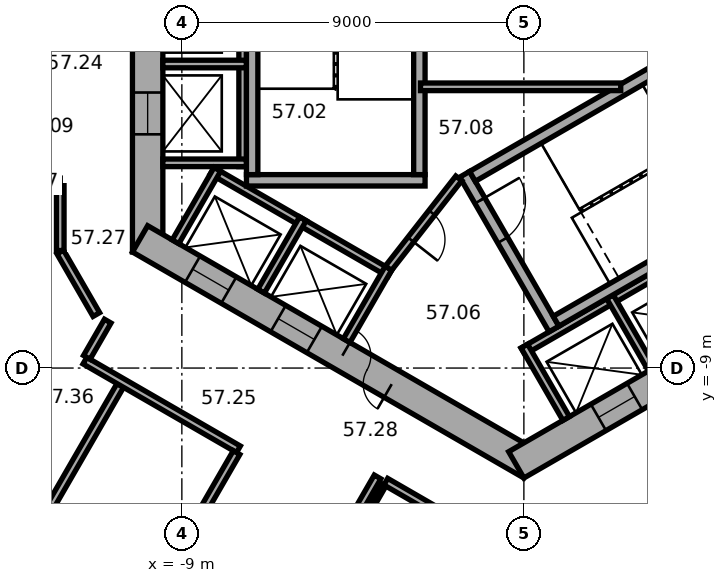
"""IFC4 building model, lengths in metres.
Left out: names, types, materials, properties, quantities, classifications, styles, units other than length and angle.
Written with IfcOpenShell. Run it as: python <this file> out.ifc"""

import sys

from ifc_helpers import new_model, si_unit, direction, frame, frame_2d, origin, place, context, subcontext, project, spatial, rectangle, extrude, element, fill, save


model = new_model("IFC4")
c1 = context("Model", 3, precision=1e-05, world=origin(), true_north=direction((0.0, 1.0)))
c2 = subcontext(c1, "Body", "Model", "MODEL_VIEW")
j1 = project(units=[si_unit("LENGTHUNIT", "METRE"), si_unit("PLANEANGLEUNIT", "RADIAN")], contexts=[c1])
p1 = place(None, origin())
s1 = spatial("IfcSite", under=j1, at=p1, CompositionType="ELEMENT")
p2 = place(p1, origin())
s2 = spatial("IfcBuilding", under=s1, at=p2, CompositionType="ELEMENT")
p3 = place(p2, frame((0.0, 0.0, 232.8)))
s3 = spatial("IfcBuildingStorey", under=s2, at=p3, CompositionType="ELEMENT", Elevation=232.8)
p4 = place(p3, frame((-9.9, 5.947, 0.0), z_axis=(0.0, 0.0, 1.0), x_axis=(0.0, -1.0, 0.0)))
e1 = element("IfcWall", 1, at=p4, inside=s3, PredefinedType="SHEAR", context=c2, shape_type="SweptSolid", body=[
    extrude(rectangle(XDim=11.894, YDim=0.8, at=frame_2d((5.947, 0.0))), origin(), (0.0, 0.0, 1.0), 3.7),
])
p5 = place(p4, frame((5.097, 0.0, 0.0)))
e2 = element("IfcOpeningElement", 2, at=p5, cuts=e1, PredefinedType="OPENING", context=c2, shape_type="SweptSolid", body=[
    extrude(rectangle(XDim=1.1, YDim=2.1, at=frame_2d((0.55, 1.05))), frame((0.0, 0.41, 0.0), z_axis=(0.0, -1.0, 0.0), x_axis=(1.0, 0.0, 0.0)), (0.0, 0.0, 1.0), 0.82),
])
p6 = place(p4, frame((7.697, 0.0, 0.0)))
e3 = element("IfcOpeningElement", 3, at=p6, cuts=e1, PredefinedType="OPENING", context=c2, shape_type="SweptSolid", body=[
    extrude(rectangle(XDim=1.1, YDim=2.1, at=frame_2d((0.55, 1.05))), frame((0.0, 0.41, 0.0), z_axis=(0.0, -1.0, 0.0), x_axis=(1.0, 0.0, 0.0)), (0.0, 0.0, 1.0), 0.82),
])
p7 = place(p3, frame((-10.1, -5.6, 0.0), z_axis=(0.0, 0.0, 1.0), x_axis=(0.866023897231, -0.500002609418, 0.0)))
e4 = element("IfcWall", 4, at=p7, inside=s3, PredefinedType="SHEAR", context=c2, shape_type="SweptSolid", body=[
    extrude(rectangle(XDim=11.894, YDim=0.8, at=frame_2d((5.947, 0.0))), origin(), (0.0, 0.0, 1.0), 3.7),
])
p8 = place(p7, frame((6.147, 0.0, 0.0)))
e5 = element("IfcOpeningElement", 5, at=p8, cuts=e4, PredefinedType="OPENING", context=c2, shape_type="SweptSolid", body=[
    extrude(rectangle(XDim=1.5, YDim=2.1, at=frame_2d((0.75, 1.05))), frame((0.0, 0.41, 0.0), z_axis=(0.0, -1.0, 0.0), x_axis=(1.0, 0.0, 0.0)), (0.0, 0.0, 1.0), 0.82),
])
p9 = place(p7, frame((1.597, 0.0, 0.0)))
e6 = element("IfcOpeningElement", 6, at=p9, cuts=e4, PredefinedType="OPENING", context=c2, shape_type="SweptSolid", body=[
    extrude(rectangle(XDim=1.1, YDim=2.1, at=frame_2d((0.55, 1.05))), frame((0.0, 0.41, 0.0), z_axis=(0.0, -1.0, 0.0), x_axis=(1.0, 0.0, 0.0)), (0.0, 0.0, 1.0), 0.82),
])
p10 = place(p7, frame((4.197, 0.0, 0.0)))
e7 = element("IfcOpeningElement", 7, at=p10, cuts=e4, PredefinedType="OPENING", context=c2, shape_type="SweptSolid", body=[
    extrude(rectangle(XDim=1.1, YDim=2.1, at=frame_2d((0.55, 1.05))), frame((0.0, 0.41, 0.0), z_axis=(0.0, -1.0, 0.0), x_axis=(1.0, 0.0, 0.0)), (0.0, 0.0, 1.0), 0.82),
])
p11 = place(p3, frame((-0.2, -11.547, 0.0), z_axis=(0.0, 0.0, 1.0), x_axis=(0.866023897231, 0.500002609418, 0.0)))
e8 = element("IfcWall", 8, at=p11, inside=s3, PredefinedType="SHEAR", context=c2, shape_type="SweptSolid", body=[
    extrude(rectangle(XDim=11.894, YDim=0.8, at=frame_2d((5.947, 0.0))), origin(), (0.0, 0.0, 1.0), 3.7),
])
p12 = place(p11, frame((2.497, 0.0, 0.0)))
e9 = element("IfcOpeningElement", 9, at=p12, cuts=e8, PredefinedType="OPENING", context=c2, shape_type="SweptSolid", body=[
    extrude(rectangle(XDim=1.1, YDim=2.1, at=frame_2d((0.55, 1.05))), frame((0.0, 0.41, 0.0), z_axis=(0.0, -1.0, 0.0), x_axis=(1.0, 0.0, 0.0)), (0.0, 0.0, 1.0), 0.82),
])
p13 = place(p11, frame((5.097, 0.0, 0.0)))
e10 = element("IfcOpeningElement", 10, at=p13, cuts=e8, PredefinedType="OPENING", context=c2, shape_type="SweptSolid", body=[
    extrude(rectangle(XDim=1.1, YDim=2.1, at=frame_2d((0.55, 1.05))), frame((0.0, 0.41, 0.0), z_axis=(0.0, -1.0, 0.0), x_axis=(1.0, 0.0, 0.0)), (0.0, 0.0, 1.0), 0.82),
])
p14 = place(p11, frame((7.697, 0.0, 0.0)))
e11 = element("IfcOpeningElement", 11, at=p14, cuts=e8, PredefinedType="OPENING", context=c2, shape_type="SweptSolid", body=[
    extrude(rectangle(XDim=1.1, YDim=2.1, at=frame_2d((0.55, 1.05))), frame((0.0, 0.41, 0.0), z_axis=(0.0, -1.0, 0.0), x_axis=(1.0, 0.0, 0.0)), (0.0, 0.0, 1.0), 0.82),
])
p15 = place(p3, frame((2.739, -22.711, 0.0), z_axis=(0.0, 0.0, 1.0), x_axis=(0.833885723098, 0.551937134838, 0.0)))
e12 = element("IfcWall", 12, at=p15, inside=s3, PredefinedType="STANDARD", context=c2, shape_type="SweptSolid", body=[
    extrude(rectangle(XDim=18.841, YDim=0.2, at=frame_2d((9.421, 0.0))), origin(), (0.0, 0.0, 1.0), 3.7),
])
p16 = place(p15, frame((1.252, 0.0, 0.9)))
e13 = element("IfcOpeningElement", 13, at=p16, cuts=e12, PredefinedType="OPENING", context=c2, shape_type="SweptSolid", body=[
    extrude(rectangle(XDim=2.2, YDim=2.0, at=frame_2d((1.1, 1.0))), frame((0.0, 0.11, 0.0), z_axis=(0.0, -1.0, 0.0), x_axis=(1.0, 0.0, 0.0)), (0.0, 0.0, 1.0), 0.22),
])
p17 = place(p15, frame((4.786, 0.0, 0.9)))
e14 = element("IfcOpeningElement", 14, at=p17, cuts=e12, PredefinedType="OPENING", context=c2, shape_type="SweptSolid", body=[
    extrude(rectangle(XDim=2.2, YDim=2.0, at=frame_2d((1.1, 1.0))), frame((0.0, 0.11, 0.0), z_axis=(0.0, -1.0, 0.0), x_axis=(1.0, 0.0, 0.0)), (0.0, 0.0, 1.0), 0.22),
])
p18 = place(p15, frame((8.32, 0.0, 0.9)))
e15 = element("IfcOpeningElement", 15, at=p18, cuts=e12, PredefinedType="OPENING", context=c2, shape_type="SweptSolid", body=[
    extrude(rectangle(XDim=2.2, YDim=2.0, at=frame_2d((1.1, 1.0))), frame((0.0, 0.11, 0.0), z_axis=(0.0, -1.0, 0.0), x_axis=(1.0, 0.0, 0.0)), (0.0, 0.0, 1.0), 0.22),
])
p19 = place(p15, frame((11.854, 0.0, 0.9)))
e16 = element("IfcOpeningElement", 16, at=p19, cuts=e12, PredefinedType="OPENING", context=c2, shape_type="SweptSolid", body=[
    extrude(rectangle(XDim=2.2, YDim=2.0, at=frame_2d((1.1, 1.0))), frame((0.0, 0.11, 0.0), z_axis=(0.0, -1.0, 0.0), x_axis=(1.0, 0.0, 0.0)), (0.0, 0.0, 1.0), 0.22),
])
p20 = place(p15, frame((15.387, 0.0, 0.9)))
e17 = element("IfcOpeningElement", 17, at=p20, cuts=e12, PredefinedType="OPENING", context=c2, shape_type="SweptSolid", body=[
    extrude(rectangle(XDim=2.2, YDim=2.0, at=frame_2d((1.1, 1.0))), frame((0.0, 0.11, 0.0), z_axis=(0.0, -1.0, 0.0), x_axis=(1.0, 0.0, 0.0)), (0.0, 0.0, 1.0), 0.22),
])
p21 = place(p3, frame((-7.4, 4.3, 0.0), z_axis=(0.0, 0.0, 1.0), x_axis=(0.0, -1.0, 0.0)))
e18 = element("IfcWall", 18, at=p21, inside=s3, PredefinedType="PARTITIONING", context=c2, shape_type="SweptSolid", body=[
    extrude(rectangle(XDim=8.0, YDim=0.2, at=frame_2d((4.0, 0.0))), origin(), (0.0, 0.0, 1.0), 3.42),
])
for number, where, z_axis, x_axis in (
    (19, (-7.3, -1.0, 0.0), (0.0, 0.0, 1.0), (-1.0, 0.0, 0.0)),
    (20, (-7.3, -3.6, 0.0), (0.0, 0.0, 1.0), (-1.0, 0.0, 0.0)),
):
    element("IfcWall", number, at=place(p3, frame(where, z_axis=z_axis, x_axis=x_axis)), inside=s3, PredefinedType="PARTITIONING", context=c2, shape_type="SweptSolid", body=[
        extrude(rectangle(XDim=2.2, YDim=0.2, at=frame_2d((1.1, 0.0))), origin(), (0.0, 0.0, 1.0), 3.42),
    ])
p22 = place(p3, frame((-8.203, -3.809, 0.0), z_axis=(0.0, 0.0, 1.0), x_axis=(0.866028230842, -0.499995103361, 0.0)))
e21 = element("IfcWall", 21, at=p22, inside=s3, PredefinedType="PARTITIONING", context=c2, shape_type="SweptSolid", body=[
    extrude(rectangle(XDim=5.4, YDim=0.2, at=frame_2d((2.7, 0.0))), origin(), (0.0, 0.0, 1.0), 3.42),
])
for number, where, z_axis, x_axis in (
    (22, (-8.067, -3.772, 0.0), (0.0, 0.0, 1.0), (-0.5, -0.866, 0.0)),
    (23, (-5.815, -5.072, 0.0), (0.0, 0.0, 1.0), (-0.5, -0.866, 0.0)),
):
    element("IfcWall", number, at=place(p3, frame(where, z_axis=z_axis, x_axis=x_axis)), inside=s3, PredefinedType="PARTITIONING", context=c2, shape_type="SweptSolid", body=[
        extrude(rectangle(XDim=2.2, YDim=0.2, at=frame_2d((1.1, 0.0))), origin(), (0.0, 0.0, 1.0), 3.42),
    ])
p23 = place(p3, frame((-3.563, -6.372, 0.0), z_axis=(0.0, 0.0, 1.0), x_axis=(-0.499994660107, -0.866028486751, 0.0)))
e24 = element("IfcWall", 24, at=p23, inside=s3, PredefinedType="PARTITIONING", context=c2, shape_type="SweptSolid", body=[
    extrude(rectangle(XDim=2.2, YDim=0.2, at=frame_2d((1.1, 0.0))), origin(), (0.0, 0.0, 1.0), 3.42),
])
p24 = place(p3, frame((-0.024, -8.559, 0.0), z_axis=(0.0, 0.0, 1.0), x_axis=(0.866026010844, 0.49999894854, 0.0)))
e25 = element("IfcWall", 25, at=p24, inside=s3, PredefinedType="PARTITIONING", context=c2, shape_type="SweptSolid", body=[
    extrude(rectangle(XDim=8.0, YDim=0.2, at=frame_2d((4.0, 0.0))), origin(), (0.0, 0.0, 1.0), 3.42),
])
for number, where, z_axis, x_axis in (
    (26, (0.013, -8.422, 0.0), (0.0, 0.0, 1.0), (0.5, -0.866, 0.0)),
    (27, (2.264, -7.122, 0.0), (0.0, 0.0, 1.0), (0.5, -0.866, 0.0)),
):
    element("IfcWall", number, at=place(p3, frame(where, z_axis=z_axis, x_axis=x_axis)), inside=s3, PredefinedType="PARTITIONING", context=c2, shape_type="SweptSolid", body=[
        extrude(rectangle(XDim=2.2, YDim=0.2, at=frame_2d((1.1, 0.0))), origin(), (0.0, 0.0, 1.0), 3.42),
    ])
p25 = place(p3, frame((-2.6, -4.06, 0.0), z_axis=(0.0, 0.0, 1.0), x_axis=(-1.0, 0.0, 0.0)))
e28 = element("IfcWall", 28, at=p25, inside=s3, PredefinedType="SHEAR", context=c2, shape_type="SweptSolid", body=[
    extrude(rectangle(XDim=4.7, YDim=0.3, at=frame_2d((2.35, 0.0))), origin(), (0.0, 0.0, 1.0), 3.42),
])
for number, where, z_axis, x_axis in (
    (29, (-2.75, 3.15, 0.0), (0.0, 0.0, 1.0), (0.0, -1.0, 0.0)),
    (30, (-7.15, 3.15, 0.0), (0.0, 0.0, 1.0), (0.0, -1.0, 0.0)),
):
    element("IfcWall", number, at=place(p3, frame(where, z_axis=z_axis, x_axis=x_axis)), inside=s3, PredefinedType="SHEAR", context=c2, shape_type="SweptSolid", body=[
        extrude(rectangle(XDim=7.06, YDim=0.3, at=frame_2d((3.53, 0.0))), origin(), (0.0, 0.0, 1.0), 3.42),
    ])
p26 = place(p3, frame((-1.558, -3.902, 0.0), z_axis=(0.0, 0.0, 1.0), x_axis=(0.499977259774, -0.866038532462, 0.0)))
e31 = element("IfcWall", 31, at=p26, inside=s3, PredefinedType="SHEAR", context=c2, shape_type="SweptSolid", body=[
    extrude(rectangle(XDim=4.7, YDim=0.3, at=frame_2d((2.35, 0.0))), origin(), (0.0, 0.0, 1.0), 3.42),
])
p27 = place(p26, frame((0.8, 0.0, 0.0)))
e32 = element("IfcOpeningElement", 32, at=p27, cuts=e31, PredefinedType="OPENING", context=c2, shape_type="SweptSolid", body=[
    extrude(rectangle(XDim=1.2, YDim=2.1, at=frame_2d((0.6, 1.05))), frame((0.0, 0.16, 0.0), z_axis=(0.0, -1.0, 0.0), x_axis=(1.0, 0.0, 0.0)), (0.0, 0.0, 1.0), 0.32),
])
for number, where, z_axis, x_axis in (
    (33, (-1.353, -3.957, 0.0), (0.0, 0.0, 1.0), (0.866, 0.5, 0.0)),
    (34, (0.847, -7.767, 0.0), (0.0, 0.0, 1.0), (0.866, 0.5, 0.0)),
):
    element("IfcWall", number, at=place(p3, frame(where, z_axis=z_axis, x_axis=x_axis)), inside=s3, PredefinedType="SHEAR", context=c2, shape_type="SweptSolid", body=[
        extrude(rectangle(XDim=7.06, YDim=0.3, at=frame_2d((3.53, 0.0))), origin(), (0.0, 0.0, 1.0), 3.42),
    ])
p28 = place(p3, frame((-1.712, -4.008, 0.0), z_axis=(0.0, 0.0, 1.0), x_axis=(-0.616549420702, -0.787316208287, 0.0)))
e35 = element("IfcWall", 35, at=p28, inside=s3, PredefinedType="PARTITIONING", context=c2, shape_type="SweptSolid", body=[
    extrude(rectangle(XDim=3.002, YDim=0.2, at=frame_2d((1.501, 0.0))), origin(), (0.0, 0.0, 1.0), 3.42),
])
p29 = place(p28, frame((1.15, 0.0, 0.0)))
e36 = element("IfcOpeningElement", 36, at=p29, cuts=e35, PredefinedType="OPENING", context=c2, shape_type="SweptSolid", body=[
    extrude(rectangle(XDim=0.9, YDim=2.1, at=frame_2d((0.45, 1.05))), frame((0.0, 0.11, 0.0), z_axis=(0.0, -1.0, 0.0), x_axis=(1.0, 0.0, 0.0)), (0.0, 0.0, 1.0), 0.22),
])
p30 = place(p3, frame((-2.72, -1.6, 0.0), z_axis=(0.0, 0.0, 1.0), x_axis=(1.0, 0.0, 0.0)))
e37 = element("IfcWall", 37, at=p30, inside=s3, PredefinedType="PARTITIONING", context=c2, shape_type="SweptSolid", body=[
    extrude(rectangle(XDim=5.269, YDim=0.2, at=frame_2d((2.634, 0.0))), origin(), (0.0, 0.0, 1.0), 3.42),
])
p31 = place(p3, frame((-13.646, -14.696, 0.0), z_axis=(0.0, 0.0, 1.0), x_axis=(0.500006596359, 0.866021595341, 0.0)))
e38 = element("IfcWall", 38, at=p31, inside=s3, PredefinedType="PARTITIONING", context=c2, shape_type="SweptSolid", body=[
    extrude(rectangle(XDim=6.049, YDim=0.2, at=frame_2d((3.025, 0.0))), origin(), (0.0, 0.0, 1.0), 3.42),
])
p32 = place(p3, frame((-13.401, -4.101, 0.0), z_axis=(0.0, 0.0, 1.0), x_axis=(1.0, 0.0, 0.0)))
e39 = element("IfcWall", 39, at=p32, inside=s3, PredefinedType="PARTITIONING", context=c2, shape_type="SweptSolid", body=[
    extrude(rectangle(XDim=1.201, YDim=0.2, at=frame_2d((0.601, 0.0))), origin(), (0.0, 0.0, 1.0), 3.42),
])
p33 = place(p3, frame((-12.2, -5.947, 0.0), z_axis=(0.0, 0.0, 1.0), x_axis=(0.500022797313, -0.86601224135, 0.0)))
e40 = element("IfcWall", 40, at=p33, inside=s3, PredefinedType="PARTITIONING", context=c2, shape_type="SweptSolid", body=[
    extrude(rectangle(XDim=1.9, YDim=0.2, at=frame_2d((0.95, 0.0))), origin(), (0.0, 0.0, 1.0), 3.42),
])
p34 = place(p3, frame((-12.2, -4.201, 0.0), z_axis=(0.0, 0.0, 1.0), x_axis=(0.0, -1.0, 0.0)))
e41 = element("IfcWall", 41, at=p34, inside=s3, PredefinedType="PARTITIONING", context=c2, shape_type="SweptSolid", body=[
    extrude(rectangle(XDim=1.706, YDim=0.2, at=frame_2d((0.853, 0.0))), origin(), (0.0, 0.0, 1.0), 3.42),
])
p35 = place(p3, frame((-11.551, -8.805, 0.0), z_axis=(0.0, 0.0, 1.0), x_axis=(0.866038310922, -0.499977643516, 0.0)))
e42 = element("IfcWall", 42, at=p35, inside=s3, PredefinedType="PARTITIONING", context=c2, shape_type="SweptSolid", body=[
    extrude(rectangle(XDim=4.665, YDim=0.2, at=frame_2d((2.333, 0.0))), origin(), (0.0, 0.0, 1.0), 3.42),
])
p36 = place(p3, frame((-10.951, -7.765, 0.0), z_axis=(0.0, 0.0, 1.0), x_axis=(-0.499978356969, -0.866037899034, 0.0)))
e43 = element("IfcWall", 43, at=p36, inside=s3, PredefinedType="PARTITIONING", context=c2, shape_type="SweptSolid", body=[
    extrude(rectangle(XDim=1.101, YDim=0.2, at=frame_2d((0.551, 0.0))), origin(), (0.0, 0.0, 1.0), 3.42),
])
p37 = place(p3, frame((-10.585, -16.463, 0.0), z_axis=(0.0, 0.0, 1.0), x_axis=(0.499993802756, 0.866028981735, 0.0)))
e44 = element("IfcWall", 44, at=p37, inside=s3, PredefinedType="PARTITIONING", context=c2, shape_type="SweptSolid", body=[
    extrude(rectangle(XDim=6.049, YDim=0.2, at=frame_2d((3.024, 0.0))), origin(), (0.0, 0.0, 1.0), 2.87),
])
p38 = place(p37, frame((2.524, 0.0, 0.0)))
e45 = element("IfcOpeningElement", 45, at=p38, cuts=e44, PredefinedType="OPENING", context=c2, shape_type="SweptSolid", body=[
    extrude(rectangle(XDim=1.0, YDim=2.1, at=frame_2d((0.5, 1.05))), frame((0.0, 0.11, 0.0), z_axis=(0.0, -1.0, 0.0), x_axis=(1.0, 0.0, 0.0)), (0.0, 0.0, 1.0), 0.22),
])
p39 = place(p3, frame((-7.525, -18.23, 0.0), z_axis=(0.0, 0.0, 1.0), x_axis=(0.499983153418, 0.866035129944, 0.0)))
e46 = element("IfcWall", 46, at=p39, inside=s3, PredefinedType="PARTITIONING", context=c2, shape_type="SweptSolid", body=[
    extrude(rectangle(XDim=7.35, YDim=0.2, at=frame_2d((3.675, 0.0))), origin(), (0.0, 0.0, 1.0), 3.42),
])
p40 = place(p39, frame((2.975, 0.0, 0.0)))
e47 = element("IfcOpeningElement", 47, at=p40, cuts=e46, PredefinedType="OPENING", context=c2, shape_type="SweptSolid", body=[
    extrude(rectangle(XDim=1.0, YDim=2.1, at=frame_2d((0.5, 1.05))), frame((0.0, 0.11, 0.0), z_axis=(0.0, -1.0, 0.0), x_axis=(1.0, 0.0, 0.0)), (0.0, 0.0, 1.0), 0.22),
])
p41 = place(p3, frame((-5.233, -14.761, 0.0), z_axis=(0.0, 0.0, 1.0), x_axis=(0.499967891604, 0.866043940782, 0.0)))
e48 = element("IfcWall", 48, at=p41, inside=s3, PredefinedType="PARTITIONING", context=c2, shape_type="SweptSolid", body=[
    extrude(rectangle(XDim=3.1, YDim=0.12, at=frame_2d((1.55, 0.0))), origin(), (0.0, 0.0, 1.0), 3.42),
])
p42 = place(p3, frame((-3.634, -11.99, 0.0), z_axis=(0.0, 0.0, 1.0), x_axis=(0.866018616679, -0.500011755427, 0.0)))
e49 = element("IfcWall", 49, at=p42, inside=s3, PredefinedType="PARTITIONING", context=c2, shape_type="SweptSolid", body=[
    extrude(rectangle(XDim=2.8, YDim=0.2, at=frame_2d((1.4, 0.0))), origin(), (0.0, 0.0, 1.0), 3.42),
])
p43 = place(p3, frame((2.716, -13.906, 0.0), z_axis=(0.0, 0.0, 1.0), x_axis=(0.866040290674, 0.499974214264, 0.0)))
e50 = element("IfcWall", 50, at=p43, inside=s3, PredefinedType="PARTITIONING", context=c2, shape_type="SweptSolid", body=[
    extrude(rectangle(XDim=8.702, YDim=0.2, at=frame_2d((4.351, 0.0))), origin(), (0.0, 0.0, 1.0), 3.42),
])
p44 = place(p43, frame((2.679, 0.0, 0.0)))
e51 = element("IfcOpeningElement", 51, at=p44, cuts=e50, PredefinedType="OPENING", context=c2, shape_type="SweptSolid", body=[
    extrude(rectangle(XDim=1.0, YDim=2.1, at=frame_2d((0.5, 1.05))), frame((0.0, 0.11, 0.0), z_axis=(0.0, -1.0, 0.0), x_axis=(1.0, 0.0, 0.0)), (0.0, 0.0, 1.0), 0.22),
])
p45 = place(p3, frame((3.117, -15.638, 0.0), z_axis=(0.0, 0.0, 1.0), x_axis=(0.866031365477, 0.499989673903, 0.0)))
e52 = element("IfcWall", 52, at=p45, inside=s3, PredefinedType="PARTITIONING", context=c2, shape_type="SweptSolid", body=[
    extrude(rectangle(XDim=6.881, YDim=0.12, at=frame_2d((3.44, 0.0))), origin(), (0.0, 0.0, 1.0), 3.42),
])
p46 = place(p45, frame((0.5, 0.0, 0.0)))
e53 = element("IfcOpeningElement", 53, at=p46, cuts=e52, PredefinedType="OPENING", context=c2, shape_type="SweptSolid", body=[
    extrude(rectangle(XDim=1.0, YDim=2.1, at=frame_2d((0.5, 1.05))), frame((0.0, 0.07, 0.0), z_axis=(0.0, -1.0, 0.0), x_axis=(1.0, 0.0, 0.0)), (0.0, 0.0, 1.0), 0.14),
])
p47 = place(p45, frame((2.583, 0.0, 0.0)))
e54 = element("IfcOpeningElement", 54, at=p47, cuts=e52, PredefinedType="OPENING", context=c2, shape_type="SweptSolid", body=[
    extrude(rectangle(XDim=0.9, YDim=2.1, at=frame_2d((0.45, 1.05))), frame((0.0, 0.07, 0.0), z_axis=(0.0, -1.0, 0.0), x_axis=(1.0, 0.0, 0.0)), (0.0, 0.0, 1.0), 0.14),
])
p48 = place(p45, frame((5.023, 0.0, 0.0)))
e55 = element("IfcOpeningElement", 55, at=p48, cuts=e52, PredefinedType="OPENING", context=c2, shape_type="SweptSolid", body=[
    extrude(rectangle(XDim=0.9, YDim=2.1, at=frame_2d((0.45, 1.05))), frame((0.0, 0.07, 0.0), z_axis=(0.0, -1.0, 0.0), x_axis=(1.0, 0.0, 0.0)), (0.0, 0.0, 1.0), 0.14),
])
p49 = place(p8, origin())
e56 = element("IfcDoor", 56, at=p49, inside=s3, OperationType="DOUBLE_DOOR_SINGLE_SWING", PredefinedType="DOOR", context=c2, shape_type="SweptSolid", body=[
    extrude(rectangle(XDim=1.5, YDim=2.1, at=frame_2d((0.75, 1.05))), frame((0.0, 0.025, 0.0), z_axis=(0.0, -1.0, 0.0), x_axis=(1.0, 0.0, 0.0)), (0.0, 0.0, 1.0), 0.05),
])
fill(e5, e56)
p50 = place(p27, origin())
e57 = element("IfcDoor", 57, at=p50, inside=s3, OperationType="SINGLE_SWING_RIGHT", PredefinedType="DOOR", context=c2, shape_type="SweptSolid", body=[
    extrude(rectangle(XDim=1.2, YDim=2.1, at=frame_2d((0.6, 1.05))), frame((0.0, 0.025, 0.0), z_axis=(0.0, -1.0, 0.0), x_axis=(1.0, 0.0, 0.0)), (0.0, 0.0, 1.0), 0.05),
])
fill(e32, e57)
p51 = place(p29, origin())
e58 = element("IfcDoor", 58, at=p51, inside=s3, OperationType="SINGLE_SWING_LEFT", PredefinedType="DOOR", context=c2, shape_type="SweptSolid", body=[
    extrude(rectangle(XDim=0.9, YDim=2.1, at=frame_2d((0.45, 1.05))), frame((0.0, 0.025, 0.0), z_axis=(0.0, -1.0, 0.0), x_axis=(1.0, 0.0, 0.0)), (0.0, 0.0, 1.0), 0.05),
])
fill(e36, e58)
p52 = place(p6, origin())
e59 = element("IfcDoor", 59, at=p52, inside=s3, OperationType="DOUBLE_DOOR_SLIDING", PredefinedType="DOOR", context=c2, shape_type="SweptSolid", body=[
    extrude(rectangle(XDim=1.1, YDim=2.1, at=frame_2d((0.55, 1.05))), frame((0.0, 0.025, 0.0), z_axis=(0.0, -1.0, 0.0), x_axis=(1.0, 0.0, 0.0)), (0.0, 0.0, 1.0), 0.05),
])
fill(e3, e59)
p53 = place(p9, origin())
e60 = element("IfcDoor", 60, at=p53, inside=s3, OperationType="DOUBLE_DOOR_SLIDING", PredefinedType="DOOR", context=c2, shape_type="SweptSolid", body=[
    extrude(rectangle(XDim=1.1, YDim=2.1, at=frame_2d((0.55, 1.05))), frame((0.0, 0.025, 0.0), z_axis=(0.0, -1.0, 0.0), x_axis=(1.0, 0.0, 0.0)), (0.0, 0.0, 1.0), 0.05),
])
fill(e6, e60)
p54 = place(p10, origin())
e61 = element("IfcDoor", 61, at=p54, inside=s3, OperationType="DOUBLE_DOOR_SLIDING", PredefinedType="DOOR", context=c2, shape_type="SweptSolid", body=[
    extrude(rectangle(XDim=1.1, YDim=2.1, at=frame_2d((0.55, 1.05))), frame((0.0, 0.025, 0.0), z_axis=(0.0, -1.0, 0.0), x_axis=(1.0, 0.0, 0.0)), (0.0, 0.0, 1.0), 0.05),
])
fill(e7, e61)
p55 = place(p12, origin())
e62 = element("IfcDoor", 62, at=p55, inside=s3, OperationType="DOUBLE_DOOR_SLIDING", PredefinedType="DOOR", context=c2, shape_type="SweptSolid", body=[
    extrude(rectangle(XDim=1.1, YDim=2.1, at=frame_2d((0.55, 1.05))), frame((0.0, 0.025, 0.0), z_axis=(0.0, -1.0, 0.0), x_axis=(1.0, 0.0, 0.0)), (0.0, 0.0, 1.0), 0.05),
])
fill(e9, e62)
save(model, sys.argv[1])
